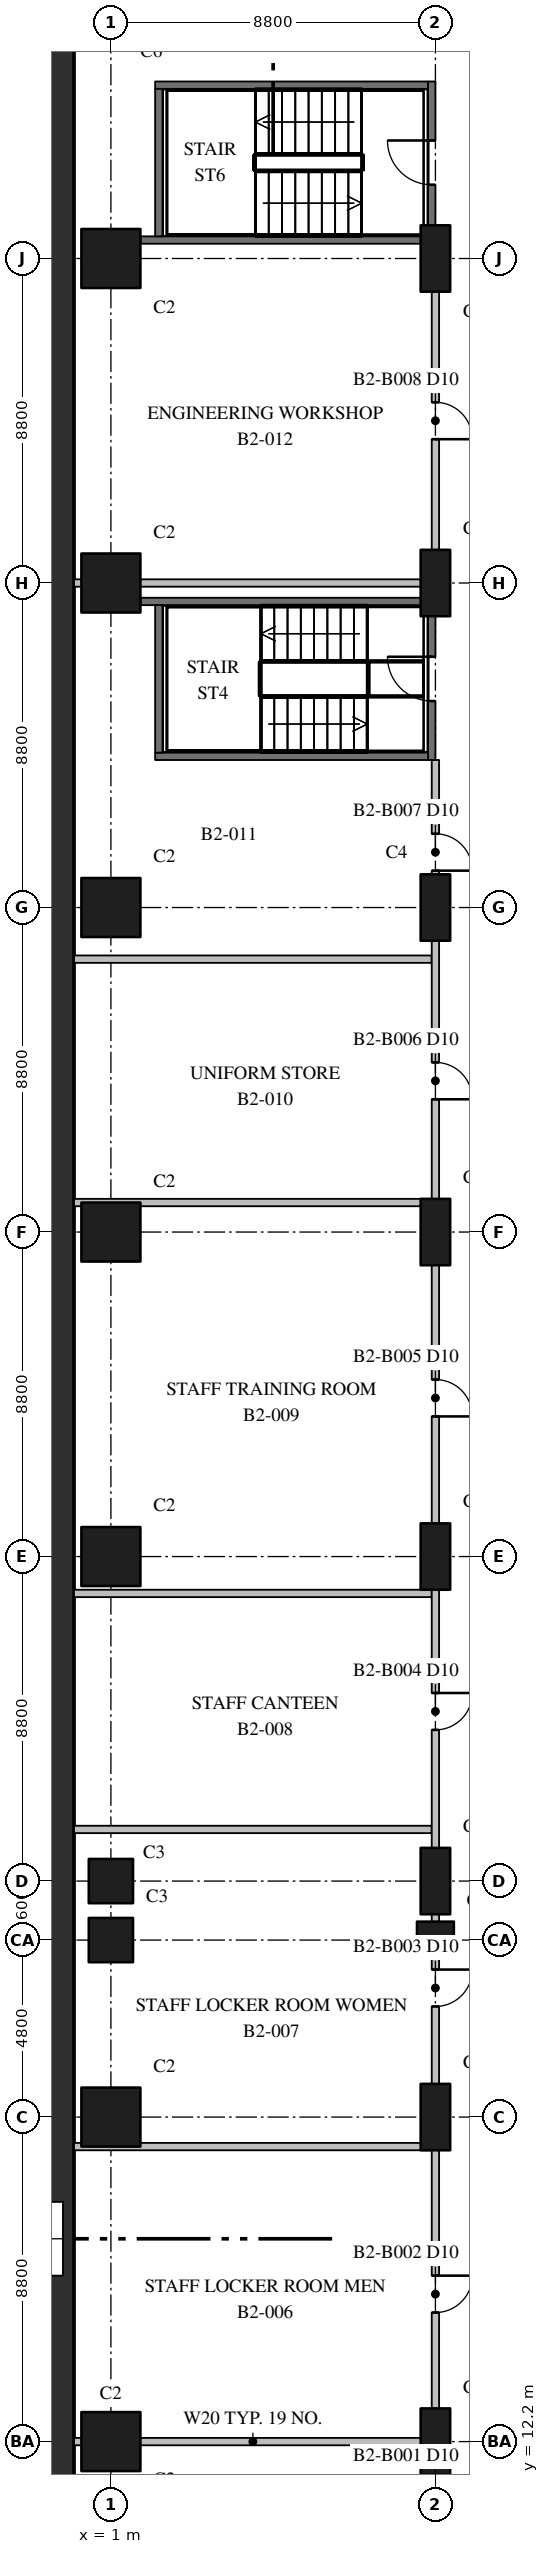
"""IFC4 building model, lengths in metres.
Left out: names, types, materials, properties, quantities, classifications, styles, units other than length and angle.
Written with IfcOpenShell. Run it as: python <this file> out.ifc"""

import sys

from ifc_helpers import new_model, si_unit, direction, frame, frame_2d, origin, origin_2d, place, context, subcontext, project, spatial, rectangle, extrude, element, fill, save


model = new_model("IFC4")
c1 = context("Model", 3, precision=1e-05, world=origin(), true_north=direction((0.0, 1.0)))
c2 = subcontext(c1, "Body", "Model", "MODEL_VIEW")
j1 = project(units=[si_unit("LENGTHUNIT", "METRE"), si_unit("PLANEANGLEUNIT", "RADIAN")], contexts=[c1])
p1 = place(None, origin())
s1 = spatial("IfcSite", under=j1, at=p1, CompositionType="ELEMENT")
p2 = place(p1, origin())
s2 = spatial("IfcBuilding", under=s1, at=p2, CompositionType="ELEMENT")
p3 = place(p2, frame((0.0, 0.0, -12.0)))
s3 = spatial("IfcBuildingStorey", under=s2, at=p3, CompositionType="ELEMENT", Elevation=-12.0)
for number, where, z_axis, x_axis in (
    (1, (1.0, 12.2, 0.0), (0.0, 0.0, 1.0), (1.0, 0.0, 0.0)),
    (2, (1.0, 21.0, 0.0), (0.0, 0.0, 1.0), (1.0, 0.0, 0.0)),
):
    element("IfcColumn", number, at=place(p3, frame(where, z_axis=z_axis, x_axis=x_axis)), inside=s3, PredefinedType="COLUMN", context=c2, shape_type="SweptSolid", body=[
        extrude(rectangle(XDim=1.6, YDim=1.6, at=origin_2d()), origin(), (0.0, 0.0, 1.0), 5.0),
    ])
for number, where, z_axis, x_axis in (
    (3, (1.0, 25.8, 0.0), (0.0, 0.0, 1.0), (1.0, 0.0, 0.0)),
    (4, (1.0, 27.4, 0.0), (0.0, 0.0, 1.0), (1.0, 0.0, 0.0)),
):
    element("IfcColumn", number, at=place(p3, frame(where, z_axis=z_axis, x_axis=x_axis)), inside=s3, PredefinedType="COLUMN", context=c2, shape_type="SweptSolid", body=[
        extrude(rectangle(XDim=1.2, YDim=1.2, at=origin_2d()), origin(), (0.0, 0.0, 1.0), 5.0),
    ])
for number, where, z_axis, x_axis in (
    (5, (1.0, 36.2, 0.0), (0.0, 0.0, 1.0), (1.0, 0.0, 0.0)),
    (6, (1.0, 45.0, 0.0), (0.0, 0.0, 1.0), (1.0, 0.0, 0.0)),
    (7, (1.0, 53.8, 0.0), (0.0, 0.0, 1.0), (1.0, 0.0, 0.0)),
    (8, (1.0, 62.6, 0.0), (0.0, 0.0, 1.0), (1.0, 0.0, 0.0)),
    (9, (1.0, 71.4, 0.0), (0.0, 0.0, 1.0), (1.0, 0.0, 0.0)),
):
    element("IfcColumn", number, at=place(p3, frame(where, z_axis=z_axis, x_axis=x_axis)), inside=s3, PredefinedType="COLUMN", context=c2, shape_type="SweptSolid", body=[
        extrude(rectangle(XDim=1.6, YDim=1.6, at=origin_2d()), origin(), (0.0, 0.0, 1.0), 5.0),
    ])
for number, where, z_axis, x_axis in (
    (10, (9.8, 12.2, 0.0), (0.0, 0.0, 1.0), (0.0, 1.0, 0.0)),
    (11, (9.8, 21.0, 0.0), (0.0, 0.0, 1.0), (0.0, 1.0, 0.0)),
):
    element("IfcColumn", number, at=place(p3, frame(where, z_axis=z_axis, x_axis=x_axis)), inside=s3, PredefinedType="COLUMN", context=c2, shape_type="SweptSolid", body=[
        extrude(rectangle(XDim=1.8, YDim=0.8, at=origin_2d()), origin(), (0.0, 0.0, 1.0), 5.0),
    ])
p4 = place(p3, frame((9.8, 25.8, 0.0), z_axis=(0.0, 0.0, 1.0), x_axis=(1.0, 0.0, 0.0)))
e12 = element("IfcColumn", 12, at=p4, inside=s3, PredefinedType="COLUMN", context=c2, shape_type="SweptSolid", body=[
    extrude(rectangle(XDim=1.0, YDim=1.0, at=origin_2d()), origin(), (0.0, 0.0, 1.0), 5.0),
])
for number, where, z_axis, x_axis in (
    (13, (9.8, 27.4, 0.0), (0.0, 0.0, 1.0), (0.0, 1.0, 0.0)),
    (14, (9.8, 36.2, 0.0), (0.0, 0.0, 1.0), (0.0, 1.0, 0.0)),
    (15, (9.8, 45.0, 0.0), (0.0, 0.0, 1.0), (0.0, 1.0, 0.0)),
    (16, (9.8, 53.8, 0.0), (0.0, 0.0, 1.0), (0.0, 1.0, 0.0)),
    (17, (9.8, 62.6, 0.0), (0.0, 0.0, 1.0), (0.0, 1.0, 0.0)),
    (18, (9.8, 71.4, 0.0), (0.0, 0.0, 1.0), (0.0, 1.0, 0.0)),
):
    element("IfcColumn", number, at=place(p3, frame(where, z_axis=z_axis, x_axis=x_axis)), inside=s3, PredefinedType="COLUMN", context=c2, shape_type="SweptSolid", body=[
        extrude(rectangle(XDim=1.8, YDim=0.8, at=origin_2d()), origin(), (0.0, 0.0, 1.0), 5.0),
    ])
p5 = place(p3, frame((-0.4, 1.4, 0.0), z_axis=(0.0, 0.0, 1.0), x_axis=(0.0, 1.0, 0.0)))
e19 = element("IfcWall", 19, at=p5, inside=s3, PredefinedType="SHEAR", context=c2, shape_type="SweptSolid", body=[
    extrude(rectangle(XDim=78.0, YDim=0.8, at=frame_2d((39.0, 0.0))), origin(), (0.0, 0.0, 1.0), 5.0),
])
p6 = place(p3, frame((9.7, 57.8, 0.0), z_axis=(0.0, 0.0, 1.0), x_axis=(0.0, 1.0, 0.0)))
e20 = element("IfcWall", 20, at=p6, inside=s3, PredefinedType="SHEAR", context=c2, shape_type="SweptSolid", body=[
    extrude(rectangle(XDim=4.4, YDim=0.2, at=frame_2d((2.2, 0.0))), origin(), (0.0, 0.0, 1.0), 4.598),
])
p7 = place(p6, frame((1.6, 0.0, 0.0)))
e21 = element("IfcOpeningElement", 21, at=p7, cuts=e20, PredefinedType="OPENING", context=c2, shape_type="SweptSolid", body=[
    extrude(rectangle(XDim=1.2, YDim=2.1, at=frame_2d((0.6, 1.05))), frame((0.0, 0.11, 0.0), z_axis=(0.0, -1.0, 0.0), x_axis=(1.0, 0.0, 0.0)), (0.0, 0.0, 1.0), 0.22),
])
p8 = place(p3, frame((1.8, 62.1, 0.0), z_axis=(0.0, 0.0, 1.0), x_axis=(1.0, 0.0, 0.0)))
e22 = element("IfcWall", 22, at=p8, inside=s3, PredefinedType="SHEAR", context=c2, shape_type="SweptSolid", body=[
    extrude(rectangle(XDim=7.8, YDim=0.2, at=frame_2d((3.9, 0.0))), origin(), (0.0, 0.0, 1.0), 4.598),
])
p9 = place(p3, frame((2.2, 57.9, 0.0), z_axis=(0.0, 0.0, 1.0), x_axis=(1.0, 0.0, 0.0)))
e23 = element("IfcWall", 23, at=p9, inside=s3, PredefinedType="SHEAR", context=c2, shape_type="SweptSolid", body=[
    extrude(rectangle(XDim=7.4, YDim=0.2, at=frame_2d((3.7, 0.0))), origin(), (0.0, 0.0, 1.0), 4.598),
])
p10 = place(p3, frame((2.3, 58.0, 0.0), z_axis=(0.0, 0.0, 1.0), x_axis=(0.0, 1.0, 0.0)))
e24 = element("IfcWall", 24, at=p10, inside=s3, PredefinedType="SHEAR", context=c2, shape_type="SweptSolid", body=[
    extrude(rectangle(XDim=4.0, YDim=0.2, at=frame_2d((2.0, 0.0))), origin(), (0.0, 0.0, 1.0), 4.598),
])
p11 = place(p3, frame((9.7, 71.8, 0.0), z_axis=(0.0, 0.0, 1.0), x_axis=(0.0, 1.0, 0.0)))
e25 = element("IfcWall", 25, at=p11, inside=s3, PredefinedType="SHEAR", context=c2, shape_type="SweptSolid", body=[
    extrude(rectangle(XDim=4.4, YDim=0.2, at=frame_2d((2.2, 0.0))), origin(), (0.0, 0.0, 1.0), 4.598),
])
p12 = place(p11, frame((1.6, 0.0, 0.0)))
e26 = element("IfcOpeningElement", 26, at=p12, cuts=e25, PredefinedType="OPENING", context=c2, shape_type="SweptSolid", body=[
    extrude(rectangle(XDim=1.2, YDim=2.1, at=frame_2d((0.6, 1.05))), frame((0.0, 0.11, 0.0), z_axis=(0.0, -1.0, 0.0), x_axis=(1.0, 0.0, 0.0)), (0.0, 0.0, 1.0), 0.22),
])
p13 = place(p3, frame((2.2, 76.1, 0.0), z_axis=(0.0, 0.0, 1.0), x_axis=(1.0, 0.0, 0.0)))
e27 = element("IfcWall", 27, at=p13, inside=s3, PredefinedType="SHEAR", context=c2, shape_type="SweptSolid", body=[
    extrude(rectangle(XDim=7.4, YDim=0.2, at=frame_2d((3.7, 0.0))), origin(), (0.0, 0.0, 1.0), 4.598),
])
p14 = place(p3, frame((1.8, 71.9, 0.0), z_axis=(0.0, 0.0, 1.0), x_axis=(1.0, 0.0, 0.0)))
e28 = element("IfcWall", 28, at=p14, inside=s3, PredefinedType="SHEAR", context=c2, shape_type="SweptSolid", body=[
    extrude(rectangle(XDim=7.8, YDim=0.2, at=frame_2d((3.9, 0.0))), origin(), (0.0, 0.0, 1.0), 4.598),
])
p15 = place(p3, frame((2.3, 72.0, 0.0), z_axis=(0.0, 0.0, 1.0), x_axis=(0.0, 1.0, 0.0)))
e29 = element("IfcWall", 29, at=p15, inside=s3, PredefinedType="SHEAR", context=c2, shape_type="SweptSolid", body=[
    extrude(rectangle(XDim=4.0, YDim=0.2, at=frame_2d((2.0, 0.0))), origin(), (0.0, 0.0, 1.0), 4.598),
])
for number, where, z_axis, x_axis in (
    (30, (0.0, 12.2, 0.0), (0.0, 0.0, 1.0), (1.0, 0.0, 0.0)),
    (31, (0.0, 20.2, 0.0), (0.0, 0.0, 1.0), (1.0, 0.0, 0.0)),
    (32, (0.0, 28.8, 0.0), (0.0, 0.0, 1.0), (1.0, 0.0, 0.0)),
    (33, (0.0, 35.2, 0.0), (0.0, 0.0, 1.0), (1.0, 0.0, 0.0)),
    (34, (0.0, 45.8, 0.0), (0.0, 0.0, 1.0), (1.0, 0.0, 0.0)),
    (35, (0.0, 52.4, 0.0), (0.0, 0.0, 1.0), (1.0, 0.0, 0.0)),
    (36, (0.0, 62.6, 0.0), (0.0, 0.0, 1.0), (1.0, 0.0, 0.0)),
):
    element("IfcWall", number, at=place(p3, frame(where, z_axis=z_axis, x_axis=x_axis)), inside=s3, PredefinedType="PARTITIONING", context=c2, shape_type="SweptSolid", body=[
        extrude(rectangle(XDim=9.7, YDim=0.2, at=frame_2d((4.85, 0.0))), origin(), (0.0, 0.0, 1.0), 4.598),
    ])
p16 = place(p3, frame((9.8, 9.8, 0.0), z_axis=(0.0, 0.0, 1.0), x_axis=(0.0, 1.0, 0.0)))
e37 = element("IfcWall", 37, at=p16, inside=s3, PredefinedType="PARTITIONING", context=c2, shape_type="SweptSolid", body=[
    extrude(rectangle(XDim=48.0, YDim=0.2, at=frame_2d((24.0, 0.0))), origin(), (0.0, 0.0, 1.0), 4.598),
])
p17 = place(p16, frame((0.4, 0.0, 0.0)))
e38 = element("IfcOpeningElement", 38, at=p17, cuts=e37, PredefinedType="OPENING", context=c2, shape_type="SweptSolid", body=[
    extrude(rectangle(XDim=1.0, YDim=2.1, at=frame_2d((0.5, 1.05))), frame((0.0, 0.11, 0.0), z_axis=(0.0, -1.0, 0.0), x_axis=(1.0, 0.0, 0.0)), (0.0, 0.0, 1.0), 0.22),
])
p18 = place(p16, frame((5.9, 0.0, 0.0)))
e39 = element("IfcOpeningElement", 39, at=p18, cuts=e37, PredefinedType="OPENING", context=c2, shape_type="SweptSolid", body=[
    extrude(rectangle(XDim=1.0, YDim=2.1, at=frame_2d((0.5, 1.05))), frame((0.0, 0.11, 0.0), z_axis=(0.0, -1.0, 0.0), x_axis=(1.0, 0.0, 0.0)), (0.0, 0.0, 1.0), 0.22),
])
p19 = place(p16, frame((14.2, 0.0, 0.0)))
e40 = element("IfcOpeningElement", 40, at=p19, cuts=e37, PredefinedType="OPENING", context=c2, shape_type="SweptSolid", body=[
    extrude(rectangle(XDim=1.0, YDim=2.1, at=frame_2d((0.5, 1.05))), frame((0.0, 0.11, 0.0), z_axis=(0.0, -1.0, 0.0), x_axis=(1.0, 0.0, 0.0)), (0.0, 0.0, 1.0), 0.22),
])
p20 = place(p16, frame((21.7, 0.0, 0.0)))
e41 = element("IfcOpeningElement", 41, at=p20, cuts=e37, PredefinedType="OPENING", context=c2, shape_type="SweptSolid", body=[
    extrude(rectangle(XDim=1.0, YDim=2.1, at=frame_2d((0.5, 1.05))), frame((0.0, 0.11, 0.0), z_axis=(0.0, -1.0, 0.0), x_axis=(1.0, 0.0, 0.0)), (0.0, 0.0, 1.0), 0.22),
])
p21 = place(p16, frame((30.2, 0.0, 0.0)))
e42 = element("IfcOpeningElement", 42, at=p21, cuts=e37, PredefinedType="OPENING", context=c2, shape_type="SweptSolid", body=[
    extrude(rectangle(XDim=1.0, YDim=2.1, at=frame_2d((0.5, 1.05))), frame((0.0, 0.11, 0.0), z_axis=(0.0, -1.0, 0.0), x_axis=(1.0, 0.0, 0.0)), (0.0, 0.0, 1.0), 0.22),
])
p22 = place(p16, frame((38.8, 0.0, 0.0)))
e43 = element("IfcOpeningElement", 43, at=p22, cuts=e37, PredefinedType="OPENING", context=c2, shape_type="SweptSolid", body=[
    extrude(rectangle(XDim=1.0, YDim=2.1, at=frame_2d((0.5, 1.05))), frame((0.0, 0.11, 0.0), z_axis=(0.0, -1.0, 0.0), x_axis=(1.0, 0.0, 0.0)), (0.0, 0.0, 1.0), 0.22),
])
p23 = place(p16, frame((45.0, 0.0, 0.0)))
e44 = element("IfcOpeningElement", 44, at=p23, cuts=e37, PredefinedType="OPENING", context=c2, shape_type="SweptSolid", body=[
    extrude(rectangle(XDim=1.0, YDim=2.1, at=frame_2d((0.5, 1.05))), frame((0.0, 0.11, 0.0), z_axis=(0.0, -1.0, 0.0), x_axis=(1.0, 0.0, 0.0)), (0.0, 0.0, 1.0), 0.22),
])
p24 = place(p3, frame((9.8, 62.2, 0.0), z_axis=(0.0, 0.0, 1.0), x_axis=(0.0, 1.0, 0.0)))
e45 = element("IfcWall", 45, at=p24, inside=s3, PredefinedType="PARTITIONING", context=c2, shape_type="SweptSolid", body=[
    extrude(rectangle(XDim=9.2, YDim=0.2, at=frame_2d((4.6, 0.0))), origin(), (0.0, 0.0, 1.0), 4.598),
])
p25 = place(p24, frame((4.3, 0.0, 0.0)))
e46 = element("IfcOpeningElement", 46, at=p25, cuts=e45, PredefinedType="OPENING", context=c2, shape_type="SweptSolid", body=[
    extrude(rectangle(XDim=1.0, YDim=2.1, at=frame_2d((0.5, 1.05))), frame((0.0, 0.11, 0.0), z_axis=(0.0, -1.0, 0.0), x_axis=(1.0, 0.0, 0.0)), (0.0, 0.0, 1.0), 0.22),
])
p26 = place(p7, origin())
e47 = element("IfcDoor", 47, at=p26, inside=s3, OperationType="SINGLE_SWING_RIGHT", PredefinedType="DOOR", context=c2, shape_type="SweptSolid", body=[
    extrude(rectangle(XDim=1.2, YDim=2.1, at=frame_2d((0.6, 1.05))), frame((0.0, 0.025, 0.0), z_axis=(0.0, -1.0, 0.0), x_axis=(1.0, 0.0, 0.0)), (0.0, 0.0, 1.0), 0.05),
])
fill(e21, e47)
p27 = place(p12, origin())
e48 = element("IfcDoor", 48, at=p27, inside=s3, OperationType="SINGLE_SWING_RIGHT", PredefinedType="DOOR", context=c2, shape_type="SweptSolid", body=[
    extrude(rectangle(XDim=1.2, YDim=2.1, at=frame_2d((0.6, 1.05))), frame((0.0, 0.025, 0.0), z_axis=(0.0, -1.0, 0.0), x_axis=(1.0, 0.0, 0.0)), (0.0, 0.0, 1.0), 0.05),
])
fill(e26, e48)
p28 = place(p18, frame((1.0, 0.0, 0.0), z_axis=(0.0, 0.0, 1.0), x_axis=(-1.0, 0.0, 0.0)))
e49 = element("IfcDoor", 49, at=p28, inside=s3, OperationType="SINGLE_SWING_RIGHT", PredefinedType="DOOR", context=c2, shape_type="SweptSolid", body=[
    extrude(rectangle(XDim=1.0, YDim=2.1, at=frame_2d((0.5, 1.05))), frame((0.0, 0.025, 0.0), z_axis=(0.0, -1.0, 0.0), x_axis=(1.0, 0.0, 0.0)), (0.0, 0.0, 1.0), 0.05),
])
fill(e39, e49)
p29 = place(p19, frame((1.0, 0.0, 0.0), z_axis=(0.0, 0.0, 1.0), x_axis=(-1.0, 0.0, 0.0)))
e50 = element("IfcDoor", 50, at=p29, inside=s3, OperationType="SINGLE_SWING_RIGHT", PredefinedType="DOOR", context=c2, shape_type="SweptSolid", body=[
    extrude(rectangle(XDim=1.0, YDim=2.1, at=frame_2d((0.5, 1.05))), frame((0.0, 0.025, 0.0), z_axis=(0.0, -1.0, 0.0), x_axis=(1.0, 0.0, 0.0)), (0.0, 0.0, 1.0), 0.05),
])
fill(e40, e50)
p30 = place(p20, frame((1.0, 0.0, 0.0), z_axis=(0.0, 0.0, 1.0), x_axis=(-1.0, 0.0, 0.0)))
e51 = element("IfcDoor", 51, at=p30, inside=s3, OperationType="SINGLE_SWING_RIGHT", PredefinedType="DOOR", context=c2, shape_type="SweptSolid", body=[
    extrude(rectangle(XDim=1.0, YDim=2.1, at=frame_2d((0.5, 1.05))), frame((0.0, 0.025, 0.0), z_axis=(0.0, -1.0, 0.0), x_axis=(1.0, 0.0, 0.0)), (0.0, 0.0, 1.0), 0.05),
])
fill(e41, e51)
p31 = place(p21, frame((1.0, 0.0, 0.0), z_axis=(0.0, 0.0, 1.0), x_axis=(-1.0, 0.0, 0.0)))
e52 = element("IfcDoor", 52, at=p31, inside=s3, OperationType="SINGLE_SWING_LEFT", PredefinedType="DOOR", context=c2, shape_type="SweptSolid", body=[
    extrude(rectangle(XDim=1.0, YDim=2.1, at=frame_2d((0.5, 1.05))), frame((0.0, 0.025, 0.0), z_axis=(0.0, -1.0, 0.0), x_axis=(1.0, 0.0, 0.0)), (0.0, 0.0, 1.0), 0.05),
])
fill(e42, e52)
p32 = place(p22, frame((1.0, 0.0, 0.0), z_axis=(0.0, 0.0, 1.0), x_axis=(-1.0, 0.0, 0.0)))
e53 = element("IfcDoor", 53, at=p32, inside=s3, OperationType="SINGLE_SWING_LEFT", PredefinedType="DOOR", context=c2, shape_type="SweptSolid", body=[
    extrude(rectangle(XDim=1.0, YDim=2.1, at=frame_2d((0.5, 1.05))), frame((0.0, 0.025, 0.0), z_axis=(0.0, -1.0, 0.0), x_axis=(1.0, 0.0, 0.0)), (0.0, 0.0, 1.0), 0.05),
])
fill(e43, e53)
p33 = place(p23, frame((1.0, 0.0, 0.0), z_axis=(0.0, 0.0, 1.0), x_axis=(-1.0, 0.0, 0.0)))
e54 = element("IfcDoor", 54, at=p33, inside=s3, OperationType="SINGLE_SWING_LEFT", PredefinedType="DOOR", context=c2, shape_type="SweptSolid", body=[
    extrude(rectangle(XDim=1.0, YDim=2.1, at=frame_2d((0.5, 1.05))), frame((0.0, 0.025, 0.0), z_axis=(0.0, -1.0, 0.0), x_axis=(1.0, 0.0, 0.0)), (0.0, 0.0, 1.0), 0.05),
])
fill(e44, e54)
p34 = place(p25, frame((1.0, 0.0, 0.0), z_axis=(0.0, 0.0, 1.0), x_axis=(-1.0, 0.0, 0.0)))
e55 = element("IfcDoor", 55, at=p34, inside=s3, OperationType="SINGLE_SWING_LEFT", PredefinedType="DOOR", context=c2, shape_type="SweptSolid", body=[
    extrude(rectangle(XDim=1.0, YDim=2.1, at=frame_2d((0.5, 1.05))), frame((0.0, 0.025, 0.0), z_axis=(0.0, -1.0, 0.0), x_axis=(1.0, 0.0, 0.0)), (0.0, 0.0, 1.0), 0.05),
])
fill(e46, e55)
save(model, sys.argv[1])
